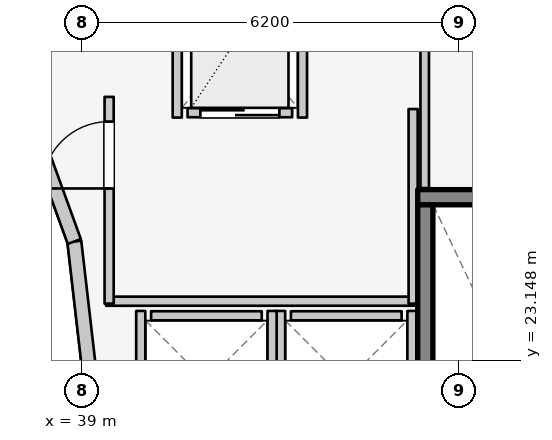
"""IFC4 building model, lengths in metres.
Left out: names, types, materials, properties, quantities, classifications, styles, units other than length and angle.
Written with IfcOpenShell. Run it as: python <this file> out.ifc"""

import sys

from ifc_helpers import new_model, si_unit, direction, frame, frame_2d, origin, place, context, subcontext, project, spatial, rectangle, extrude, element, fill, save


model = new_model("IFC4")
c1 = context("Model", 3, precision=1e-05, world=origin(), true_north=direction((0.0, 1.0)))
c2 = subcontext(c1, "Body", "Model", "MODEL_VIEW")
j1 = project(units=[si_unit("LENGTHUNIT", "METRE"), si_unit("PLANEANGLEUNIT", "RADIAN")], contexts=[c1])
p1 = place(None, origin())
s1 = spatial("IfcSite", under=j1, at=p1, CompositionType="ELEMENT")
p2 = place(p1, origin())
s2 = spatial("IfcBuilding", under=s1, at=p2, CompositionType="ELEMENT")
p3 = place(p2, frame((0.0, 0.0, 33.8)))
s3 = spatial("IfcBuildingStorey", under=s2, at=p3, CompositionType="ELEMENT", Elevation=33.8)
p4 = place(p3, frame((44.525, 25.83, 0.0), z_axis=(0.0, 0.0, 1.0), x_axis=(1.0, 0.0, 0.0)))
e1 = element("IfcWall", 1, at=p4, inside=s3, PredefinedType="SOLIDWALL", context=c2, shape_type="SweptSolid", body=[
    extrude(rectangle(XDim=3.37, YDim=0.25, at=frame_2d((1.685, 0.0))), origin(), (0.0, 0.0, 1.0), 3.1),
])
p5 = place(p3, frame((44.65, 17.895, 0.0), z_axis=(0.0, 0.0, 1.0), x_axis=(0.0, 1.0, 0.0)))
e2 = element("IfcWall", 2, at=p5, inside=s3, PredefinedType="SOLIDWALL", context=c2, shape_type="SweptSolid", body=[
    extrude(rectangle(XDim=7.81, YDim=0.25, at=frame_2d((3.905, 0.0))), origin(), (0.0, 0.0, 1.0), 3.1),
])
p6 = place(p3, frame((39.12, 23.0, 0.0), z_axis=(0.0, 0.0, 1.0), x_axis=(-0.114711713601, 0.993398823617, 0.0)))
e3 = element("IfcWall", 3, at=p6, inside=s3, PredefinedType="STANDARD", context=c2, shape_type="SweptSolid", body=[
    extrude(rectangle(XDim=2.115, YDim=0.23, at=frame_2d((1.058, 0.0))), origin(), (0.0, 0.0, 1.0), 2.56),
])
p7 = place(p3, frame((38.877, 25.102, 0.0), z_axis=(0.0, 0.0, 1.0), x_axis=(-0.341423187295, 0.93990968033, 0.0)))
e4 = element("IfcWall", 4, at=p7, inside=s3, PredefinedType="STANDARD", context=c2, shape_type="SweptSolid", body=[
    extrude(rectangle(XDim=2.084, YDim=0.23, at=frame_2d((1.042, 0.0))), origin(), (0.0, 0.0, 1.0), 2.56),
])
p8 = place(p3, frame((42.44, 23.88, 0.0), z_axis=(0.0, 0.0, 1.0), x_axis=(1.0, 0.0, 0.0)))
e5 = element("IfcWall", 5, at=p8, inside=s3, PredefinedType="SOLIDWALL", context=c2, shape_type="SweptSolid", body=[
    extrude(rectangle(XDim=1.82, YDim=0.15, at=frame_2d((0.91, 0.0))), origin(), (0.0, 0.0, 1.0), 2.575),
])
for number, where, z_axis, x_axis in (
    (6, (42.27, 21.64, 0.0), (0.0, 0.0, 1.0), (0.0, 1.0, 0.0)),
    (7, (44.43, 21.64, 0.0), (0.0, 0.0, 1.0), (0.0, 1.0, 0.0)),
):
    element("IfcWall", number, at=place(p3, frame(where, z_axis=z_axis, x_axis=x_axis)), inside=s3, PredefinedType="SOLIDWALL", context=c2, shape_type="SweptSolid", body=[
        extrude(rectangle(XDim=2.32, YDim=0.15, at=frame_2d((1.16, 0.0))), origin(), (0.0, 0.0, 1.0), 2.575),
    ])
p9 = place(p3, frame((40.14, 23.88, 0.0), z_axis=(0.0, 0.0, 1.0), x_axis=(1.0, 0.0, 0.0)))
e8 = element("IfcWall", 8, at=p9, inside=s3, PredefinedType="SOLIDWALL", context=c2, shape_type="SweptSolid", body=[
    extrude(rectangle(XDim=1.82, YDim=0.15, at=frame_2d((0.91, 0.0))), origin(), (0.0, 0.0, 1.0), 2.12),
])
p10 = place(p3, frame((39.97, 21.64, 0.0), z_axis=(0.0, 0.0, 1.0), x_axis=(0.0, 1.0, 0.0)))
e9 = element("IfcWall", 9, at=p10, inside=s3, PredefinedType="SOLIDWALL", context=c2, shape_type="SweptSolid", body=[
    extrude(rectangle(XDim=2.32, YDim=0.15, at=frame_2d((1.16, 0.0))), origin(), (0.0, 0.0, 1.0), 2.12),
])
p11 = place(p3, frame((42.13, 21.64, 0.0), z_axis=(0.0, 0.0, 1.0), x_axis=(0.0, 1.0, 0.0)))
e10 = element("IfcWall", 10, at=p11, inside=s3, PredefinedType="SOLIDWALL", context=c2, shape_type="SweptSolid", body=[
    extrude(rectangle(XDim=2.32, YDim=0.15, at=frame_2d((1.16, 0.0))), origin(), (0.0, 0.0, 1.0), 2.575),
])
p12 = place(p3, frame((40.74, 27.22, 0.0), z_axis=(0.0, 0.0, 1.0), x_axis=(1.0, 0.0, 0.0)))
e11 = element("IfcWall", 11, at=p12, inside=s3, PredefinedType="SOLIDWALL", context=c2, shape_type="SweptSolid", body=[
    extrude(rectangle(XDim=1.72, YDim=0.15, at=frame_2d((0.86, 0.0))), origin(), (0.0, 0.0, 1.0), 2.575),
])
p13 = place(p12, frame((0.21, 0.0, 0.0)))
e12 = element("IfcOpeningElement", 12, at=p13, cuts=e11, PredefinedType="OPENING", context=c2, shape_type="SweptSolid", body=[
    extrude(rectangle(XDim=1.3, YDim=2.1, at=frame_2d((0.65, 1.05))), frame((0.0, 0.085, 0.0), z_axis=(0.0, -1.0, 0.0), x_axis=(1.0, 0.0, 0.0)), (0.0, 0.0, 1.0), 0.17),
])
for number, where, z_axis, x_axis in (
    (13, (40.57, 27.14, 0.0), (0.0, 0.0, 1.0), (0.0, 1.0, 0.0)),
    (14, (42.63, 27.14, 0.0), (0.0, 0.0, 1.0), (0.0, 1.0, 0.0)),
):
    element("IfcWall", number, at=place(p3, frame(where, z_axis=z_axis, x_axis=x_axis)), inside=s3, PredefinedType="SOLIDWALL", context=c2, shape_type="SweptSolid", body=[
        extrude(rectangle(XDim=2.72, YDim=0.15, at=frame_2d((1.36, 0.0))), origin(), (0.0, 0.0, 1.0), 2.575),
    ])
p14 = place(p3, frame((39.4, 24.12, 0.0), z_axis=(0.0, 0.0, 1.0), x_axis=(1.0, 0.0, 0.0)))
e15 = element("IfcWall", 15, at=p14, inside=s3, PredefinedType="PARTITIONING", context=c2, shape_type="SweptSolid", body=[
    extrude(rectangle(XDim=5.08, YDim=0.15, at=frame_2d((2.54, 0.0))), origin(), (0.0, 0.0, 1.0), 2.12),
])
p15 = place(p3, frame((44.45, 24.08, 0.0), z_axis=(0.0, 0.0, 1.0), x_axis=(0.0, 1.0, 0.0)))
e16 = element("IfcWall", 16, at=p15, inside=s3, PredefinedType="PARTITIONING", context=c2, shape_type="SweptSolid", body=[
    extrude(rectangle(XDim=3.2, YDim=0.15, at=frame_2d((1.6, 0.0))), origin(), (0.0, 0.0, 1.0), 2.575),
])
p16 = place(p3, frame((39.45, 24.08, 0.0), z_axis=(0.0, 0.0, 1.0), x_axis=(0.0, 1.0, 0.0)))
e17 = element("IfcWall", 17, at=p16, inside=s3, PredefinedType="PARTITIONING", context=c2, shape_type="SweptSolid", body=[
    extrude(rectangle(XDim=3.4, YDim=0.15, at=frame_2d((1.7, 0.0))), origin(), (0.0, 0.0, 1.0), 2.575),
])
p17 = place(p16, frame((1.894, 0.0, 0.0)))
e18 = element("IfcOpeningElement", 18, at=p17, cuts=e17, PredefinedType="OPENING", context=c2, shape_type="SweptSolid", body=[
    extrude(rectangle(XDim=1.1, YDim=2.1, at=frame_2d((0.55, 1.05))), frame((0.0, 0.085, 0.0), z_axis=(0.0, -1.0, 0.0), x_axis=(1.0, 0.0, 0.0)), (0.0, 0.0, 1.0), 0.17),
])
p18 = place(p3, frame((44.64, 25.98, 0.0), z_axis=(0.0, 0.0, 1.0), x_axis=(0.0, 1.0, 0.0)))
e19 = element("IfcWall", 19, at=p18, inside=s3, PredefinedType="PLUMBINGWALL", context=c2, shape_type="SweptSolid", body=[
    extrude(rectangle(XDim=3.88, YDim=0.14, at=frame_2d((1.94, 0.0))), origin(), (0.0, 0.0, 1.0), 2.575),
])
p19 = place(p13, origin())
e20 = element("IfcDoor", 20, at=p19, inside=s3, OperationType="DOUBLE_DOOR_SLIDING", PredefinedType="DOOR", context=c2, shape_type="SweptSolid", body=[
    extrude(rectangle(XDim=1.3, YDim=2.1, at=frame_2d((0.65, 1.05))), frame((0.0, 0.025, 0.0), z_axis=(0.0, -1.0, 0.0), x_axis=(1.0, 0.0, 0.0)), (0.0, 0.0, 1.0), 0.05),
])
fill(e12, e20)
p20 = place(p17, origin())
e21 = element("IfcDoor", 21, at=p20, inside=s3, OperationType="SINGLE_SWING_LEFT", PredefinedType="DOOR", context=c2, shape_type="SweptSolid", body=[
    extrude(rectangle(XDim=1.1, YDim=2.1, at=frame_2d((0.55, 1.05))), frame((0.0, 0.025, 0.0), z_axis=(0.0, -1.0, 0.0), x_axis=(1.0, 0.0, 0.0)), (0.0, 0.0, 1.0), 0.05),
])
fill(e18, e21)
save(model, sys.argv[1])
